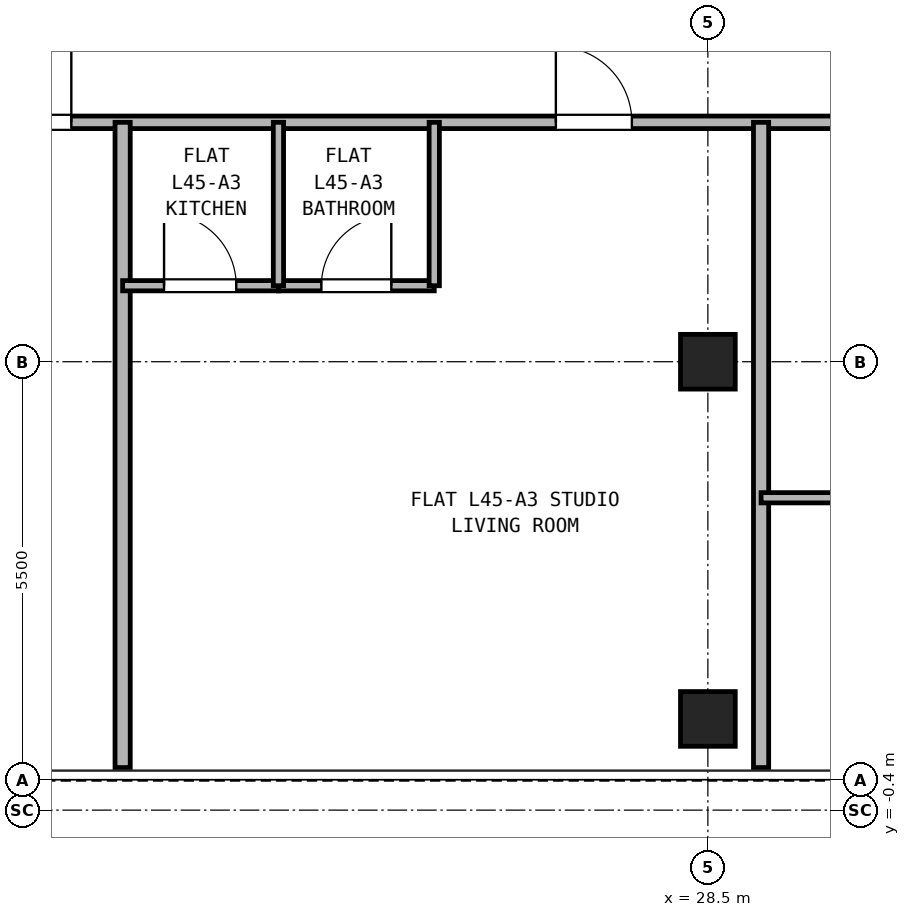
"""IFC4 building model, lengths in metres.
Left out: names, types, materials, properties, quantities, classifications, styles, units other than length and angle.
Written with IfcOpenShell. Run it as: python <this file> out.ifc"""

import sys

from ifc_helpers import new_model, si_unit, direction, frame, frame_2d, origin, origin_2d, place, context, subcontext, project, spatial, rectangle, hollow_rectangle, extrude, source, transform, mapped, element, fill, save


model = new_model("IFC4")
c1 = context("Model", 3, precision=1e-05, world=origin(), true_north=direction((0.0, 1.0)))
c2 = subcontext(c1, "Body", "Model", "MODEL_VIEW")
j1 = project(units=[si_unit("LENGTHUNIT", "METRE"), si_unit("PLANEANGLEUNIT", "RADIAN")], contexts=[c1])
p1 = place(None, origin())
s1 = spatial("IfcSite", under=j1, at=p1, CompositionType="ELEMENT")
p2 = place(p1, origin())
s2 = spatial("IfcBuilding", under=s1, at=p2, CompositionType="ELEMENT")
p3 = place(p2, frame((0.0, 0.0, 162.5)))
s3 = spatial("IfcBuildingStorey", under=s2, at=p3, CompositionType="ELEMENT", Elevation=162.5)
m1 = source(origin(), c2, "Body", "SweptSolid", [
    extrude(hollow_rectangle(XDim=0.72, YDim=0.72, WallThickness=0.04, at=origin_2d()), origin(), (0.0, 0.0, 1.0), 2.95),
])
for number, where, z_axis, x_axis in (
    (1, (28.5, 0.8, 0.0), (0.0, 0.0, 1.0), (1.0, 0.0, 0.0)),
    (2, (28.5, 5.5, 0.0), (0.0, 0.0, 1.0), (1.0, 0.0, 0.0)),
):
    element("IfcColumn", number, at=place(p3, frame(where, z_axis=z_axis, x_axis=x_axis)), inside=s3, PredefinedType="COLUMN", context=c2, shape_type="MappedRepresentation", body=[
        mapped(m1, transform((0.0, 0.0, 0.0), x_axis=(1.0, 0.0, 0.0), y_axis=(0.0, 1.0, 0.0), z_axis=(0.0, 0.0, 1.0), scale=1.0)),
    ])
p4 = place(p3, frame((0.16, 8.65, 0.0), z_axis=(0.0, 0.0, 1.0), x_axis=(1.0, 0.0, 0.0)))
e3 = element("IfcWall", 3, at=p4, inside=s3, PredefinedType="PARTITIONING", context=c2, shape_type="SweptSolid", body=[
    extrude(rectangle(XDim=41.48, YDim=0.165, at=frame_2d((20.74, 0.0))), origin(), (0.0, 0.0, 1.0), 2.583),
])
p5 = place(p4, frame((9.39, 0.0, 0.0)))
e4 = element("IfcOpeningElement", 4, at=p5, cuts=e3, PredefinedType="OPENING", context=c2, shape_type="SweptSolid", body=[
    extrude(rectangle(XDim=1.0, YDim=2.15, at=frame_2d((0.5, 1.075))), frame((0.0, 0.093, 0.0), z_axis=(0.0, -1.0, 0.0), x_axis=(1.0, 0.0, 0.0)), (0.0, 0.0, 1.0), 0.185),
])
p6 = place(p4, frame((18.965, 0.0, 0.0)))
e5 = element("IfcOpeningElement", 5, at=p6, cuts=e3, PredefinedType="OPENING", context=c2, shape_type="SweptSolid", body=[
    extrude(rectangle(XDim=1.0, YDim=2.15, at=frame_2d((0.5, 1.075))), frame((0.0, 0.093, 0.0), z_axis=(0.0, -1.0, 0.0), x_axis=(1.0, 0.0, 0.0)), (0.0, 0.0, 1.0), 0.185),
])
p7 = place(p4, frame((26.34, 0.0, 0.0)))
e6 = element("IfcOpeningElement", 6, at=p7, cuts=e3, PredefinedType="OPENING", context=c2, shape_type="SweptSolid", body=[
    extrude(rectangle(XDim=1.0, YDim=2.15, at=frame_2d((0.5, 1.075))), frame((0.0, 0.093, 0.0), z_axis=(0.0, -1.0, 0.0), x_axis=(1.0, 0.0, 0.0)), (0.0, 0.0, 1.0), 0.185),
])
p8 = place(p4, frame((31.715, 0.0, 0.0)))
e7 = element("IfcOpeningElement", 7, at=p8, cuts=e3, PredefinedType="OPENING", context=c2, shape_type="SweptSolid", body=[
    extrude(rectangle(XDim=1.0, YDim=2.15, at=frame_2d((0.5, 1.075))), frame((0.0, 0.093, 0.0), z_axis=(0.0, -1.0, 0.0), x_axis=(1.0, 0.0, 0.0)), (0.0, 0.0, 1.0), 0.185),
])
p9 = place(p3, frame((20.8, 0.16, 0.0), z_axis=(0.0, 0.0, 1.0), x_axis=(0.0, 1.0, 0.0)))
e8 = element("IfcWall", 8, at=p9, inside=s3, PredefinedType="PARTITIONING", context=c2, shape_type="SweptSolid", body=[
    extrude(rectangle(XDim=8.49, YDim=0.2, at=frame_2d((4.245, 0.0))), origin(), (0.0, 0.0, 1.0), 2.95),
])
p10 = place(p3, frame((20.8, 6.5, 0.0), z_axis=(0.0, 0.0, 1.0), x_axis=(1.0, 0.0, 0.0)))
e9 = element("IfcWall", 9, at=p10, inside=s3, PredefinedType="PARTITIONING", context=c2, shape_type="SweptSolid", body=[
    extrude(rectangle(XDim=2.05, YDim=0.135, at=frame_2d((1.025, 0.0))), origin(), (0.0, 0.0, 1.0), 2.95),
])
p11 = place(p10, frame((0.545, 0.0, 0.0)))
e10 = element("IfcOpeningElement", 10, at=p11, cuts=e9, PredefinedType="OPENING", context=c2, shape_type="SweptSolid", body=[
    extrude(rectangle(XDim=0.95, YDim=2.15, at=frame_2d((0.475, 1.075))), frame((0.0, 0.077, 0.0), z_axis=(0.0, -1.0, 0.0), x_axis=(1.0, 0.0, 0.0)), (0.0, 0.0, 1.0), 0.155),
])
p12 = place(p3, frame((22.85, 6.5, 0.0), z_axis=(0.0, 0.0, 1.0), x_axis=(1.0, 0.0, 0.0)))
e11 = element("IfcWall", 11, at=p12, inside=s3, PredefinedType="PARTITIONING", context=c2, shape_type="SweptSolid", body=[
    extrude(rectangle(XDim=2.05, YDim=0.135, at=frame_2d((1.025, 0.0))), origin(), (0.0, 0.0, 1.0), 2.95),
])
p13 = place(p12, frame((0.565, 0.0, 0.0)))
e12 = element("IfcOpeningElement", 12, at=p13, cuts=e11, PredefinedType="OPENING", context=c2, shape_type="SweptSolid", body=[
    extrude(rectangle(XDim=0.92, YDim=2.1, at=frame_2d((0.46, 1.05))), frame((0.0, 0.077, 0.0), z_axis=(0.0, -1.0, 0.0), x_axis=(1.0, 0.0, 0.0)), (0.0, 0.0, 1.0), 0.155),
])
for number, where, z_axis, x_axis in (
    (13, (22.85, 6.5, 0.0), (0.0, 0.0, 1.0), (0.0, 1.0, 0.0)),
    (14, (24.9, 6.5, 0.0), (0.0, 0.0, 1.0), (0.0, 1.0, 0.0)),
):
    element("IfcWall", number, at=place(p3, frame(where, z_axis=z_axis, x_axis=x_axis)), inside=s3, PredefinedType="PARTITIONING", context=c2, shape_type="SweptSolid", body=[
        extrude(rectangle(XDim=2.15, YDim=0.135, at=frame_2d((1.075, 0.0))), origin(), (0.0, 0.0, 1.0), 2.95),
    ])
p14 = place(p3, frame((29.2, 0.16, 0.0), z_axis=(0.0, 0.0, 1.0), x_axis=(0.0, 1.0, 0.0)))
e15 = element("IfcWall", 15, at=p14, inside=s3, PredefinedType="PARTITIONING", context=c2, shape_type="SweptSolid", body=[
    extrude(rectangle(XDim=8.49, YDim=0.2, at=frame_2d((4.245, 0.0))), origin(), (0.0, 0.0, 1.0), 2.95),
])
p15 = place(p3, frame((29.2, 3.71, 0.0), z_axis=(0.0, 0.0, 1.0), x_axis=(1.0, 0.0, 0.0)))
e16 = element("IfcWall", 16, at=p15, inside=s3, PredefinedType="PARTITIONING", context=c2, shape_type="SweptSolid", body=[
    extrude(rectangle(XDim=5.425, YDim=0.135, at=frame_2d((2.712, 0.0))), origin(), (0.0, 0.0, 1.0), 2.95),
])
p16 = place(p15, frame((2.233, 0.0, 0.0)))
e17 = element("IfcOpeningElement", 17, at=p16, cuts=e16, PredefinedType="OPENING", context=c2, shape_type="SweptSolid", body=[
    extrude(rectangle(XDim=0.95, YDim=2.15, at=frame_2d((0.475, 1.075))), frame((0.0, 0.077, 0.0), z_axis=(0.0, -1.0, 0.0), x_axis=(1.0, 0.0, 0.0)), (0.0, 0.0, 1.0), 0.155),
])
p17 = place(p6, frame((1.0, 0.0, 0.0), z_axis=(0.0, 0.0, 1.0), x_axis=(-1.0, 0.0, 0.0)))
e18 = element("IfcDoor", 18, at=p17, inside=s3, OperationType="SINGLE_SWING_RIGHT", PredefinedType="DOOR", context=c2, shape_type="SweptSolid", body=[
    extrude(rectangle(XDim=1.0, YDim=2.15, at=frame_2d((0.5, 1.075))), frame((0.0, 0.025, 0.0), z_axis=(0.0, -1.0, 0.0), x_axis=(1.0, 0.0, 0.0)), (0.0, 0.0, 1.0), 0.05),
])
fill(e5, e18)
p18 = place(p11, origin())
e19 = element("IfcDoor", 19, at=p18, inside=s3, OperationType="SINGLE_SWING_LEFT", PredefinedType="DOOR", context=c2, shape_type="SweptSolid", body=[
    extrude(rectangle(XDim=0.95, YDim=2.15, at=frame_2d((0.475, 1.075))), frame((0.0, 0.025, 0.0), z_axis=(0.0, -1.0, 0.0), x_axis=(1.0, 0.0, 0.0)), (0.0, 0.0, 1.0), 0.05),
])
fill(e10, e19)
p19 = place(p13, origin())
e20 = element("IfcDoor", 20, at=p19, inside=s3, OperationType="SINGLE_SWING_RIGHT", PredefinedType="DOOR", context=c2, shape_type="SweptSolid", body=[
    extrude(rectangle(XDim=0.92, YDim=2.1, at=frame_2d((0.46, 1.05))), frame((0.0, 0.025, 0.0), z_axis=(0.0, -1.0, 0.0), x_axis=(1.0, 0.0, 0.0)), (0.0, 0.0, 1.0), 0.05),
])
fill(e12, e20)
p20 = place(p7, frame((1.0, 0.0, 0.0), z_axis=(0.0, 0.0, 1.0), x_axis=(-1.0, 0.0, 0.0)))
e21 = element("IfcDoor", 21, at=p20, inside=s3, OperationType="SINGLE_SWING_LEFT", PredefinedType="DOOR", context=c2, shape_type="SweptSolid", body=[
    extrude(rectangle(XDim=1.0, YDim=2.15, at=frame_2d((0.5, 1.075))), frame((0.0, 0.025, 0.0), z_axis=(0.0, -1.0, 0.0), x_axis=(1.0, 0.0, 0.0)), (0.0, 0.0, 1.0), 0.05),
])
fill(e6, e21)
save(model, sys.argv[1])
